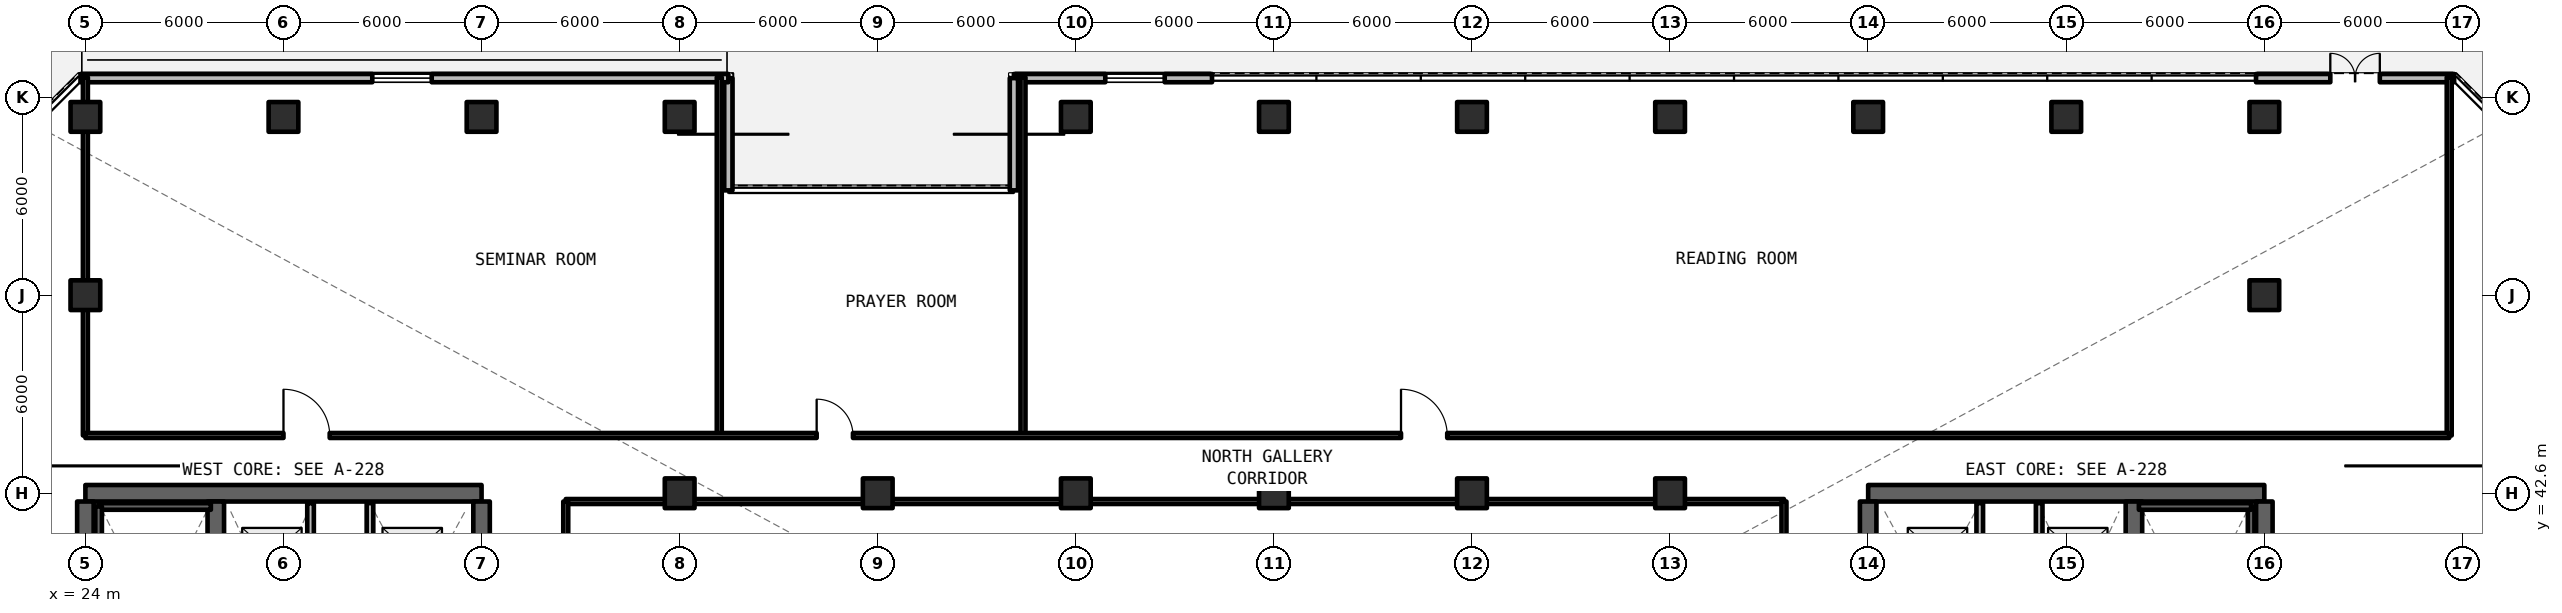
"""IFC4 building model, lengths in metres.
Left out: names, types, materials, properties, quantities, classifications, styles, units other than length and angle.
Written with IfcOpenShell. Run it as: python <this file> out.ifc"""

import sys

from ifc_helpers import new_model, si_unit, direction, frame, frame_2d, origin, origin_2d, place, context, subcontext, project, spatial, rectangle, extrude, element, fill, save


model = new_model("IFC4")
c1 = context("Model", 3, precision=1e-05, world=origin(), true_north=direction((0.0, 1.0)))
c2 = subcontext(c1, "Body", "Model", "MODEL_VIEW")
j1 = project(units=[si_unit("LENGTHUNIT", "METRE"), si_unit("PLANEANGLEUNIT", "RADIAN")], contexts=[c1])
p1 = place(None, origin())
s1 = spatial("IfcSite", under=j1, at=p1, CompositionType="ELEMENT")
p2 = place(p1, origin())
s2 = spatial("IfcBuilding", under=s1, at=p2, CompositionType="ELEMENT")
p3 = place(p2, frame((0.0, 0.0, 128.04)))
s3 = spatial("IfcBuildingStorey", under=s2, at=p3, CompositionType="ELEMENT", Elevation=128.04)
p4 = place(p3, frame((36.0, 42.6, 0.0), z_axis=(0.0, 0.0, 1.0), x_axis=(-1.0, 0.0, 0.0)))
e1 = element("IfcWall", 1, at=p4, inside=s3, PredefinedType="SHEAR", context=c2, shape_type="SweptSolid", body=[
    extrude(rectangle(XDim=12.0, YDim=0.5, at=frame_2d((6.0, 0.0))), origin(), (0.0, 0.0, 1.0), 3.96),
])
p5 = place(p3, frame((24.0, 24.85, 0.0), z_axis=(0.0, 0.0, 1.0), x_axis=(0.0, 1.0, 0.0)))
e2 = element("IfcWall", 2, at=p5, inside=s3, PredefinedType="SHEAR", context=c2, shape_type="SweptSolid", body=[
    extrude(rectangle(XDim=17.5, YDim=0.5, at=frame_2d((8.75, 0.0))), origin(), (0.0, 0.0, 1.0), 3.96),
])
p6 = place(p3, frame((36.0, 36.8, 0.0), z_axis=(0.0, 0.0, 1.0), x_axis=(0.0, 1.0, 0.0)))
e3 = element("IfcWall", 3, at=p6, inside=s3, PredefinedType="SHEAR", context=c2, shape_type="SweptSolid", body=[
    extrude(rectangle(XDim=5.55, YDim=0.5, at=frame_2d((2.775, 0.0))), origin(), (0.0, 0.0, 1.0), 3.96),
])
p7 = place(p3, frame((27.95, 24.85, 0.0), z_axis=(0.0, 0.0, 1.0), x_axis=(0.0, 1.0, 0.0)))
e4 = element("IfcWall", 4, at=p7, inside=s3, PredefinedType="SHEAR", context=c2, shape_type="SweptSolid", body=[
    extrude(rectangle(XDim=17.5, YDim=0.5, at=frame_2d((8.75, 0.0))), origin(), (0.0, 0.0, 1.0), 3.96),
])
p8 = place(p7, frame((0.4, 0.0, 0.0)))
e5 = element("IfcOpeningElement", 5, at=p8, cuts=e4, PredefinedType="OPENING", context=c2, shape_type="SweptSolid", body=[
    extrude(rectangle(XDim=1.15, YDim=2.15, at=frame_2d((0.575, 1.075))), frame((0.0, 0.26, 0.0), z_axis=(0.0, -1.0, 0.0), x_axis=(1.0, 0.0, 0.0)), (0.0, 0.0, 1.0), 0.52),
])
p9 = place(p7, frame((9.6, 0.0, 0.0)))
e6 = element("IfcOpeningElement", 6, at=p9, cuts=e4, PredefinedType="OPENING", context=c2, shape_type="SweptSolid", body=[
    extrude(rectangle(XDim=1.15, YDim=2.15, at=frame_2d((0.575, 1.075))), frame((0.0, 0.26, 0.0), z_axis=(0.0, -1.0, 0.0), x_axis=(1.0, 0.0, 0.0)), (0.0, 0.0, 1.0), 0.52),
])
p10 = place(p3, frame((90.0, 42.6, 0.0), z_axis=(0.0, 0.0, 1.0), x_axis=(-1.0, 0.0, 0.0)))
e7 = element("IfcWall", 7, at=p10, inside=s3, PredefinedType="SHEAR", context=c2, shape_type="SweptSolid", body=[
    extrude(rectangle(XDim=12.0, YDim=0.5, at=frame_2d((6.0, 0.0))), origin(), (0.0, 0.0, 1.0), 3.96),
])
p11 = place(p3, frame((90.0, 24.85, 0.0), z_axis=(0.0, 0.0, 1.0), x_axis=(0.0, 1.0, 0.0)))
e8 = element("IfcWall", 8, at=p11, inside=s3, PredefinedType="SHEAR", context=c2, shape_type="SweptSolid", body=[
    extrude(rectangle(XDim=17.5, YDim=0.5, at=frame_2d((8.75, 0.0))), origin(), (0.0, 0.0, 1.0), 3.96),
])
p12 = place(p3, frame((78.0, 36.8, 0.0), z_axis=(0.0, 0.0, 1.0), x_axis=(0.0, 1.0, 0.0)))
e9 = element("IfcWall", 9, at=p12, inside=s3, PredefinedType="SHEAR", context=c2, shape_type="SweptSolid", body=[
    extrude(rectangle(XDim=5.55, YDim=0.5, at=frame_2d((2.775, 0.0))), origin(), (0.0, 0.0, 1.0), 3.96),
])
p13 = place(p3, frame((86.05, 24.85, 0.0), z_axis=(0.0, 0.0, 1.0), x_axis=(0.0, 1.0, 0.0)))
e10 = element("IfcWall", 10, at=p13, inside=s3, PredefinedType="SHEAR", context=c2, shape_type="SweptSolid", body=[
    extrude(rectangle(XDim=17.5, YDim=0.5, at=frame_2d((8.75, 0.0))), origin(), (0.0, 0.0, 1.0), 3.96),
])
p14 = place(p13, frame((0.4, 0.0, 0.0)))
e11 = element("IfcOpeningElement", 11, at=p14, cuts=e10, PredefinedType="OPENING", context=c2, shape_type="SweptSolid", body=[
    extrude(rectangle(XDim=1.15, YDim=2.15, at=frame_2d((0.575, 1.075))), frame((0.0, 0.26, 0.0), z_axis=(0.0, -1.0, 0.0), x_axis=(1.0, 0.0, 0.0)), (0.0, 0.0, 1.0), 0.52),
])
p15 = place(p13, frame((9.6, 0.0, 0.0)))
e12 = element("IfcOpeningElement", 12, at=p15, cuts=e10, PredefinedType="OPENING", context=c2, shape_type="SweptSolid", body=[
    extrude(rectangle(XDim=1.15, YDim=2.15, at=frame_2d((0.575, 1.075))), frame((0.0, 0.26, 0.0), z_axis=(0.0, -1.0, 0.0), x_axis=(1.0, 0.0, 0.0)), (0.0, 0.0, 1.0), 0.52),
])
for number, where, z_axis, x_axis in (
    (13, (42.0, 42.6, 0.0), (0.0, 0.0, 1.0), (1.0, 0.0, 0.0)),
    (14, (48.0, 42.6, 0.0), (0.0, 0.0, 1.0), (1.0, 0.0, 0.0)),
    (15, (54.0, 42.6, 0.0), (0.0, 0.0, 1.0), (1.0, 0.0, 0.0)),
    (16, (60.0, 42.6, 0.0), (0.0, 0.0, 1.0), (1.0, 0.0, 0.0)),
    (17, (66.0, 42.6, 0.0), (0.0, 0.0, 1.0), (1.0, 0.0, 0.0)),
    (18, (72.0, 42.6, 0.0), (0.0, 0.0, 1.0), (1.0, 0.0, 0.0)),
    (19, (24.0, 48.6, 0.0), (0.0, 0.0, 1.0), (1.0, 0.0, 0.0)),
    (20, (90.0, 48.6, 0.0), (0.0, 0.0, 1.0), (1.0, 0.0, 0.0)),
):
    element("IfcColumn", number, at=place(p3, frame(where, z_axis=z_axis, x_axis=x_axis)), inside=s3, PredefinedType="COLUMN", context=c2, shape_type="SweptSolid", body=[
        extrude(rectangle(XDim=0.9, YDim=0.9, at=origin_2d()), origin(), (0.0, 0.0, 1.0), 3.96),
    ])
for number, where, z_axis, x_axis in (
    (21, (24.0, 54.0, -0.28), (0.0, 0.0, 1.0), (1.0, 0.0, 0.0)),
    (22, (30.0, 54.0, -0.28), (0.0, 0.0, 1.0), (1.0, 0.0, 0.0)),
    (23, (36.0, 54.0, -0.28), (0.0, 0.0, 1.0), (1.0, 0.0, 0.0)),
    (24, (42.0, 54.0, -0.28), (0.0, 0.0, 1.0), (1.0, 0.0, 0.0)),
    (25, (54.0, 54.0, -0.28), (0.0, 0.0, 1.0), (1.0, 0.0, 0.0)),
    (26, (60.0, 54.0, -0.28), (0.0, 0.0, 1.0), (1.0, 0.0, 0.0)),
    (27, (66.0, 54.0, -0.28), (0.0, 0.0, 1.0), (1.0, 0.0, 0.0)),
    (28, (72.0, 54.0, -0.28), (0.0, 0.0, 1.0), (1.0, 0.0, 0.0)),
    (29, (78.0, 54.0, -0.28), (0.0, 0.0, 1.0), (1.0, 0.0, 0.0)),
    (30, (84.0, 54.0, -0.28), (0.0, 0.0, 1.0), (1.0, 0.0, 0.0)),
    (31, (90.0, 54.0, -0.28), (0.0, 0.0, 1.0), (1.0, 0.0, 0.0)),
):
    element("IfcColumn", number, at=place(p3, frame(where, z_axis=z_axis, x_axis=x_axis)), inside=s3, PredefinedType="COLUMN", context=c2, shape_type="SweptSolid", body=[
        extrude(rectangle(XDim=0.9, YDim=0.9, at=origin_2d()), origin(), (0.0, 0.0, 1.0), 4.24),
    ])
p16 = place(p3, frame((95.748, 55.175, 0.0), z_axis=(0.0, 0.0, 1.0), x_axis=(-1.0, 0.0, 0.0)))
e32 = element("IfcWall", 32, at=p16, inside=s3, PredefinedType="SOLIDWALL", context=c2, shape_type="SweptSolid", body=[
    extrude(rectangle(XDim=6.0, YDim=0.25, at=frame_2d((3.0, 0.0))), origin(), (0.0, 0.0, 1.0), 3.74),
])
p17 = place(p16, frame((2.25, 0.0, 0.0)))
e33 = element("IfcOpeningElement", 33, at=p17, cuts=e32, PredefinedType="OPENING", context=c2, shape_type="SweptSolid", body=[
    extrude(rectangle(XDim=1.5, YDim=2.2, at=frame_2d((0.75, 1.1))), frame((0.0, 0.135, 0.0), z_axis=(0.0, -1.0, 0.0), x_axis=(1.0, 0.0, 0.0)), (0.0, 0.0, 1.0), 0.27),
])
p18 = place(p3, frame((58.125, 55.175, 0.0), z_axis=(0.0, 0.0, 1.0), x_axis=(-1.0, 0.0, 0.0)))
e34 = element("IfcWall", 34, at=p18, inside=s3, PredefinedType="SOLIDWALL", context=c2, shape_type="SweptSolid", body=[
    extrude(rectangle(XDim=6.0, YDim=0.25, at=frame_2d((3.0, 0.0))), origin(), (0.0, 0.0, 1.0), 3.74),
])
p19 = place(p18, frame((1.433, 0.0, 0.78)))
e35 = element("IfcOpeningElement", 35, at=p19, cuts=e34, PredefinedType="OPENING", context=c2, shape_type="SweptSolid", body=[
    extrude(rectangle(XDim=1.8, YDim=1.66, at=frame_2d((0.9, 0.83))), frame((0.0, 0.135, 0.0), z_axis=(0.0, -1.0, 0.0), x_axis=(1.0, 0.0, 0.0)), (0.0, 0.0, 1.0), 0.27),
])
for number, where, z_axis, x_axis in (
    (36, (52.125, 55.175, 0.0), (0.0, 0.0, 1.0), (0.0, -1.0, 0.0)),
    (37, (43.475, 51.775, 0.0), (0.0, 0.0, 1.0), (0.0, 1.0, 0.0)),
):
    element("IfcWall", number, at=place(p3, frame(where, z_axis=z_axis, x_axis=x_axis)), inside=s3, PredefinedType="SOLIDWALL", context=c2, shape_type="SweptSolid", body=[
        extrude(rectangle(XDim=3.4, YDim=0.25, at=frame_2d((1.7, 0.0))), origin(), (0.0, 0.0, 1.0), 3.74),
    ])
p20 = place(p3, frame((43.475, 55.175, 0.0), z_axis=(0.0, 0.0, 1.0), x_axis=(-1.0, 0.0, 0.0)))
e38 = element("IfcWall", 38, at=p20, inside=s3, PredefinedType="SOLIDWALL", context=c2, shape_type="SweptSolid", body=[
    extrude(rectangle(XDim=19.623, YDim=0.25, at=frame_2d((9.812, 0.0))), origin(), (0.0, 0.0, 1.0), 3.74),
])
p21 = place(p20, frame((8.985, 0.0, 0.78)))
e39 = element("IfcOpeningElement", 39, at=p21, cuts=e38, PredefinedType="OPENING", context=c2, shape_type="SweptSolid", body=[
    extrude(rectangle(XDim=1.8, YDim=1.66, at=frame_2d((0.9, 0.83))), frame((0.0, 0.135, 0.0), z_axis=(0.0, -1.0, 0.0), x_axis=(1.0, 0.0, 0.0)), (0.0, 0.0, 1.0), 0.27),
])
p22 = place(p3, frame((30.82, 36.88, 0.0), z_axis=(0.0, 0.0, 1.0), x_axis=(0.0, 1.0, 0.0)))
e40 = element("IfcWall", 40, at=p22, inside=s3, PredefinedType="SOLIDWALL", context=c2, shape_type="SweptSolid", body=[
    extrude(rectangle(XDim=5.42, YDim=0.2, at=frame_2d((2.71, 0.0))), origin(), (0.0, 0.0, 1.0), 2.96),
])
p23 = place(p22, frame((0.8, 0.0, 0.0)))
e41 = element("IfcOpeningElement", 41, at=p23, cuts=e40, PredefinedType="OPENING", context=c2, shape_type="SweptSolid", body=[
    extrude(rectangle(XDim=1.1, YDim=2.2, at=frame_2d((0.55, 1.1))), frame((0.0, 0.11, 0.0), z_axis=(0.0, -1.0, 0.0), x_axis=(1.0, 0.0, 0.0)), (0.0, 0.0, 1.0), 0.22),
])
p24 = place(p22, frame((3.3, 0.0, 0.0)))
e42 = element("IfcOpeningElement", 42, at=p24, cuts=e40, PredefinedType="OPENING", context=c2, shape_type="SweptSolid", body=[
    extrude(rectangle(XDim=1.1, YDim=2.2, at=frame_2d((0.55, 1.1))), frame((0.0, 0.11, 0.0), z_axis=(0.0, -1.0, 0.0), x_axis=(1.0, 0.0, 0.0)), (0.0, 0.0, 1.0), 0.22),
])
p25 = place(p3, frame((32.62, 36.88, 0.0), z_axis=(0.0, 0.0, 1.0), x_axis=(0.0, 1.0, 0.0)))
e43 = element("IfcWall", 43, at=p25, inside=s3, PredefinedType="SOLIDWALL", context=c2, shape_type="SweptSolid", body=[
    extrude(rectangle(XDim=5.42, YDim=0.2, at=frame_2d((2.71, 0.0))), origin(), (0.0, 0.0, 1.0), 2.96),
])
p26 = place(p25, frame((0.8, 0.0, 0.0)))
e44 = element("IfcOpeningElement", 44, at=p26, cuts=e43, PredefinedType="OPENING", context=c2, shape_type="SweptSolid", body=[
    extrude(rectangle(XDim=1.1, YDim=2.2, at=frame_2d((0.55, 1.1))), frame((0.0, 0.11, 0.0), z_axis=(0.0, -1.0, 0.0), x_axis=(1.0, 0.0, 0.0)), (0.0, 0.0, 1.0), 0.22),
])
p27 = place(p25, frame((3.3, 0.0, 0.0)))
e45 = element("IfcOpeningElement", 45, at=p27, cuts=e43, PredefinedType="OPENING", context=c2, shape_type="SweptSolid", body=[
    extrude(rectangle(XDim=1.1, YDim=2.2, at=frame_2d((0.55, 1.1))), frame((0.0, 0.11, 0.0), z_axis=(0.0, -1.0, 0.0), x_axis=(1.0, 0.0, 0.0)), (0.0, 0.0, 1.0), 0.22),
])
p28 = place(p3, frame((83.18, 36.88, 0.0), z_axis=(0.0, 0.0, 1.0), x_axis=(0.0, 1.0, 0.0)))
e46 = element("IfcWall", 46, at=p28, inside=s3, PredefinedType="SOLIDWALL", context=c2, shape_type="SweptSolid", body=[
    extrude(rectangle(XDim=5.42, YDim=0.2, at=frame_2d((2.71, 0.0))), origin(), (0.0, 0.0, 1.0), 2.96),
])
p29 = place(p28, frame((0.8, 0.0, 0.0)))
e47 = element("IfcOpeningElement", 47, at=p29, cuts=e46, PredefinedType="OPENING", context=c2, shape_type="SweptSolid", body=[
    extrude(rectangle(XDim=1.1, YDim=2.2, at=frame_2d((0.55, 1.1))), frame((0.0, 0.11, 0.0), z_axis=(0.0, -1.0, 0.0), x_axis=(1.0, 0.0, 0.0)), (0.0, 0.0, 1.0), 0.22),
])
p30 = place(p28, frame((3.3, 0.0, 0.0)))
e48 = element("IfcOpeningElement", 48, at=p30, cuts=e46, PredefinedType="OPENING", context=c2, shape_type="SweptSolid", body=[
    extrude(rectangle(XDim=1.1, YDim=2.2, at=frame_2d((0.55, 1.1))), frame((0.0, 0.11, 0.0), z_axis=(0.0, -1.0, 0.0), x_axis=(1.0, 0.0, 0.0)), (0.0, 0.0, 1.0), 0.22),
])
p31 = place(p3, frame((81.38, 36.88, 0.0), z_axis=(0.0, 0.0, 1.0), x_axis=(0.0, 1.0, 0.0)))
e49 = element("IfcWall", 49, at=p31, inside=s3, PredefinedType="SOLIDWALL", context=c2, shape_type="SweptSolid", body=[
    extrude(rectangle(XDim=5.42, YDim=0.2, at=frame_2d((2.71, 0.0))), origin(), (0.0, 0.0, 1.0), 2.96),
])
p32 = place(p31, frame((0.8, 0.0, 0.0)))
e50 = element("IfcOpeningElement", 50, at=p32, cuts=e49, PredefinedType="OPENING", context=c2, shape_type="SweptSolid", body=[
    extrude(rectangle(XDim=1.1, YDim=2.2, at=frame_2d((0.55, 1.1))), frame((0.0, 0.11, 0.0), z_axis=(0.0, -1.0, 0.0), x_axis=(1.0, 0.0, 0.0)), (0.0, 0.0, 1.0), 0.22),
])
p33 = place(p31, frame((3.3, 0.0, 0.0)))
e51 = element("IfcOpeningElement", 51, at=p33, cuts=e49, PredefinedType="OPENING", context=c2, shape_type="SweptSolid", body=[
    extrude(rectangle(XDim=1.1, YDim=2.2, at=frame_2d((0.55, 1.1))), frame((0.0, 0.11, 0.0), z_axis=(0.0, -1.0, 0.0), x_axis=(1.0, 0.0, 0.0)), (0.0, 0.0, 1.0), 0.22),
])
p34 = place(p3, frame((38.55, 42.35, 0.0), z_axis=(0.0, 0.0, 1.0), x_axis=(1.0, 0.0, 0.0)))
e52 = element("IfcWall", 52, at=p34, inside=s3, PredefinedType="SOLIDWALL", context=c2, shape_type="SweptSolid", body=[
    extrude(rectangle(XDim=36.9, YDim=0.15, at=frame_2d((18.45, 0.0))), origin(), (0.0, 0.0, 1.0), 2.96),
])
p35 = place(p3, frame((38.55, 24.85, 0.0), z_axis=(0.0, 0.0, 1.0), x_axis=(0.0, 1.0, 0.0)))
e53 = element("IfcWall", 53, at=p35, inside=s3, PredefinedType="SOLIDWALL", context=c2, shape_type="SweptSolid", body=[
    extrude(rectangle(XDim=17.5, YDim=0.15, at=frame_2d((8.75, 0.0))), origin(), (0.0, 0.0, 1.0), 2.96),
])
p36 = place(p35, frame((7.8, 0.0, 0.0)))
e54 = element("IfcOpeningElement", 54, at=p36, cuts=e53, PredefinedType="OPENING", context=c2, shape_type="SweptSolid", body=[
    extrude(rectangle(XDim=1.4, YDim=2.15, at=frame_2d((0.7, 1.075))), frame((0.0, 0.085, 0.0), z_axis=(0.0, -1.0, 0.0), x_axis=(1.0, 0.0, 0.0)), (0.0, 0.0, 1.0), 0.17),
])
p37 = place(p3, frame((75.45, 24.85, 0.0), z_axis=(0.0, 0.0, 1.0), x_axis=(0.0, 1.0, 0.0)))
e55 = element("IfcWall", 55, at=p37, inside=s3, PredefinedType="SOLIDWALL", context=c2, shape_type="SweptSolid", body=[
    extrude(rectangle(XDim=17.5, YDim=0.15, at=frame_2d((8.75, 0.0))), origin(), (0.0, 0.0, 1.0), 2.96),
])
p38 = place(p3, frame((24.0, 44.35, 0.0), z_axis=(0.0, 0.0, 1.0), x_axis=(0.0, 1.0, 0.0)))
e56 = element("IfcWall", 56, at=p38, inside=s3, PredefinedType="SOLIDWALL", context=c2, shape_type="SweptSolid", body=[
    extrude(rectangle(XDim=10.85, YDim=0.15, at=frame_2d((5.425, 0.0))), origin(), (0.0, 0.0, 1.0), 2.96),
])
for number, where, z_axis, x_axis in (
    (57, (43.2, 44.35, 0.0), (0.0, 0.0, 1.0), (0.0, 1.0, 0.0)),
    (58, (52.4, 44.35, 0.0), (0.0, 0.0, 1.0), (0.0, 1.0, 0.0)),
):
    element("IfcWall", number, at=place(p3, frame(where, z_axis=z_axis, x_axis=x_axis)), inside=s3, PredefinedType="PARTITIONING", context=c2, shape_type="SweptSolid", body=[
        extrude(rectangle(XDim=10.85, YDim=0.15, at=frame_2d((5.425, 0.0))), origin(), (0.0, 0.0, 1.0), 2.96),
    ])
p39 = place(p3, frame((95.6, 44.35, 0.0), z_axis=(0.0, 0.0, 1.0), x_axis=(0.0, 1.0, 0.0)))
e59 = element("IfcWall", 59, at=p39, inside=s3, PredefinedType="SOLIDWALL", context=c2, shape_type="SweptSolid", body=[
    extrude(rectangle(XDim=10.85, YDim=0.15, at=frame_2d((5.425, 0.0))), origin(), (0.0, 0.0, 1.0), 2.96),
])
p40 = place(p3, frame((24.0, 44.35, 0.0), z_axis=(0.0, 0.0, 1.0), x_axis=(1.0, 0.0, 0.0)))
e60 = element("IfcWall", 60, at=p40, inside=s3, PredefinedType="SOLIDWALL", context=c2, shape_type="SweptSolid", body=[
    extrude(rectangle(XDim=71.6, YDim=0.15, at=frame_2d((35.8, 0.0))), origin(), (0.0, 0.0, 1.0), 2.96),
])
p41 = place(p40, frame((6.0, 0.0, 0.0)))
e61 = element("IfcOpeningElement", 61, at=p41, cuts=e60, PredefinedType="OPENING", context=c2, shape_type="SweptSolid", body=[
    extrude(rectangle(XDim=1.4, YDim=2.15, at=frame_2d((0.7, 1.075))), frame((0.0, 0.085, 0.0), z_axis=(0.0, -1.0, 0.0), x_axis=(1.0, 0.0, 0.0)), (0.0, 0.0, 1.0), 0.17),
])
p42 = place(p40, frame((22.15, 0.0, 0.0)))
e62 = element("IfcOpeningElement", 62, at=p42, cuts=e60, PredefinedType="OPENING", context=c2, shape_type="SweptSolid", body=[
    extrude(rectangle(XDim=1.1, YDim=2.15, at=frame_2d((0.55, 1.075))), frame((0.0, 0.085, 0.0), z_axis=(0.0, -1.0, 0.0), x_axis=(1.0, 0.0, 0.0)), (0.0, 0.0, 1.0), 0.17),
])
p43 = place(p40, frame((39.85, 0.0, 0.0)))
e63 = element("IfcOpeningElement", 63, at=p43, cuts=e60, PredefinedType="OPENING", context=c2, shape_type="SweptSolid", body=[
    extrude(rectangle(XDim=1.4, YDim=2.15, at=frame_2d((0.7, 1.075))), frame((0.0, 0.085, 0.0), z_axis=(0.0, -1.0, 0.0), x_axis=(1.0, 0.0, 0.0)), (0.0, 0.0, 1.0), 0.17),
])
p44 = place(p3, frame((27.8, 42.2, 0.0), z_axis=(0.0, 0.0, 1.0), x_axis=(-1.0, 0.0, 0.0)))
e64 = element("IfcWall", 64, at=p44, inside=s3, PredefinedType="SOLIDWALL", context=c2, shape_type="SweptSolid", body=[
    extrude(rectangle(XDim=3.4, YDim=0.2, at=frame_2d((1.7, 0.0))), origin(), (0.0, 0.0, 1.0), 3.96),
])
for number, where, z_axis, x_axis in (
    (65, (24.4, 42.2, 0.0), (0.0, 0.0, 1.0), (0.0, -1.0, 0.0)),
    (66, (89.6, 34.2, 0.0), (0.0, 0.0, 1.0), (0.0, 1.0, 0.0)),
):
    element("IfcWall", number, at=place(p3, frame(where, z_axis=z_axis, x_axis=x_axis)), inside=s3, PredefinedType="SOLIDWALL", context=c2, shape_type="SweptSolid", body=[
        extrude(rectangle(XDim=8.0, YDim=0.2, at=frame_2d((4.0, 0.0))), origin(), (0.0, 0.0, 1.0), 3.96),
    ])
p45 = place(p3, frame((89.6, 42.2, 0.0), z_axis=(0.0, 0.0, 1.0), x_axis=(-1.0, 0.0, 0.0)))
e67 = element("IfcWall", 67, at=p45, inside=s3, PredefinedType="SOLIDWALL", context=c2, shape_type="SweptSolid", body=[
    extrude(rectangle(XDim=3.4, YDim=0.2, at=frame_2d((1.7, 0.0))), origin(), (0.0, 0.0, 1.0), 3.96),
])
p46 = place(p17, frame((1.5, 0.0, 0.0), z_axis=(0.0, 0.0, 1.0), x_axis=(-1.0, 0.0, 0.0)))
e68 = element("IfcDoor", 68, at=p46, inside=s3, OperationType="SINGLE_SWING_LEFT", PredefinedType="DOOR", context=c2, shape_type="SweptSolid", body=[
    extrude(rectangle(XDim=1.5, YDim=2.2, at=frame_2d((0.75, 1.1))), frame((0.0, 0.025, 0.0), z_axis=(0.0, -1.0, 0.0), x_axis=(1.0, 0.0, 0.0)), (0.0, 0.0, 1.0), 0.05),
])
fill(e33, e68)
p47 = place(p19, origin())
e69 = element("IfcWindow", 69, at=p47, inside=s3, PartitioningType="SINGLE_PANEL", PredefinedType="WINDOW", context=c2, shape_type="SweptSolid", body=[
    extrude(rectangle(XDim=1.8, YDim=1.66, at=frame_2d((0.9, 0.83))), frame((0.0, 0.03, 0.0), z_axis=(0.0, -1.0, 0.0), x_axis=(1.0, 0.0, 0.0)), (0.0, 0.0, 1.0), 0.06),
])
fill(e35, e69)
p48 = place(p21, origin())
e70 = element("IfcWindow", 70, at=p48, inside=s3, PartitioningType="SINGLE_PANEL", PredefinedType="WINDOW", context=c2, shape_type="SweptSolid", body=[
    extrude(rectangle(XDim=1.8, YDim=1.66, at=frame_2d((0.9, 0.83))), frame((0.0, 0.03, 0.0), z_axis=(0.0, -1.0, 0.0), x_axis=(1.0, 0.0, 0.0)), (0.0, 0.0, 1.0), 0.06),
])
fill(e39, e70)
p49 = place(p41, origin())
e71 = element("IfcDoor", 71, at=p49, inside=s3, OperationType="SINGLE_SWING_RIGHT", PredefinedType="DOOR", context=c2, shape_type="SweptSolid", body=[
    extrude(rectangle(XDim=1.4, YDim=2.15, at=frame_2d((0.7, 1.075))), frame((0.0, 0.025, 0.0), z_axis=(0.0, -1.0, 0.0), x_axis=(1.0, 0.0, 0.0)), (0.0, 0.0, 1.0), 0.05),
])
fill(e61, e71)
p50 = place(p42, origin())
e72 = element("IfcDoor", 72, at=p50, inside=s3, OperationType="SINGLE_SWING_LEFT", PredefinedType="DOOR", context=c2, shape_type="SweptSolid", body=[
    extrude(rectangle(XDim=1.1, YDim=2.15, at=frame_2d((0.55, 1.075))), frame((0.0, 0.025, 0.0), z_axis=(0.0, -1.0, 0.0), x_axis=(1.0, 0.0, 0.0)), (0.0, 0.0, 1.0), 0.05),
])
fill(e62, e72)
p51 = place(p43, origin())
e73 = element("IfcDoor", 73, at=p51, inside=s3, OperationType="SINGLE_SWING_RIGHT", PredefinedType="DOOR", context=c2, shape_type="SweptSolid", body=[
    extrude(rectangle(XDim=1.4, YDim=2.15, at=frame_2d((0.7, 1.075))), frame((0.0, 0.025, 0.0), z_axis=(0.0, -1.0, 0.0), x_axis=(1.0, 0.0, 0.0)), (0.0, 0.0, 1.0), 0.05),
])
fill(e63, e73)
save(model, sys.argv[1])
